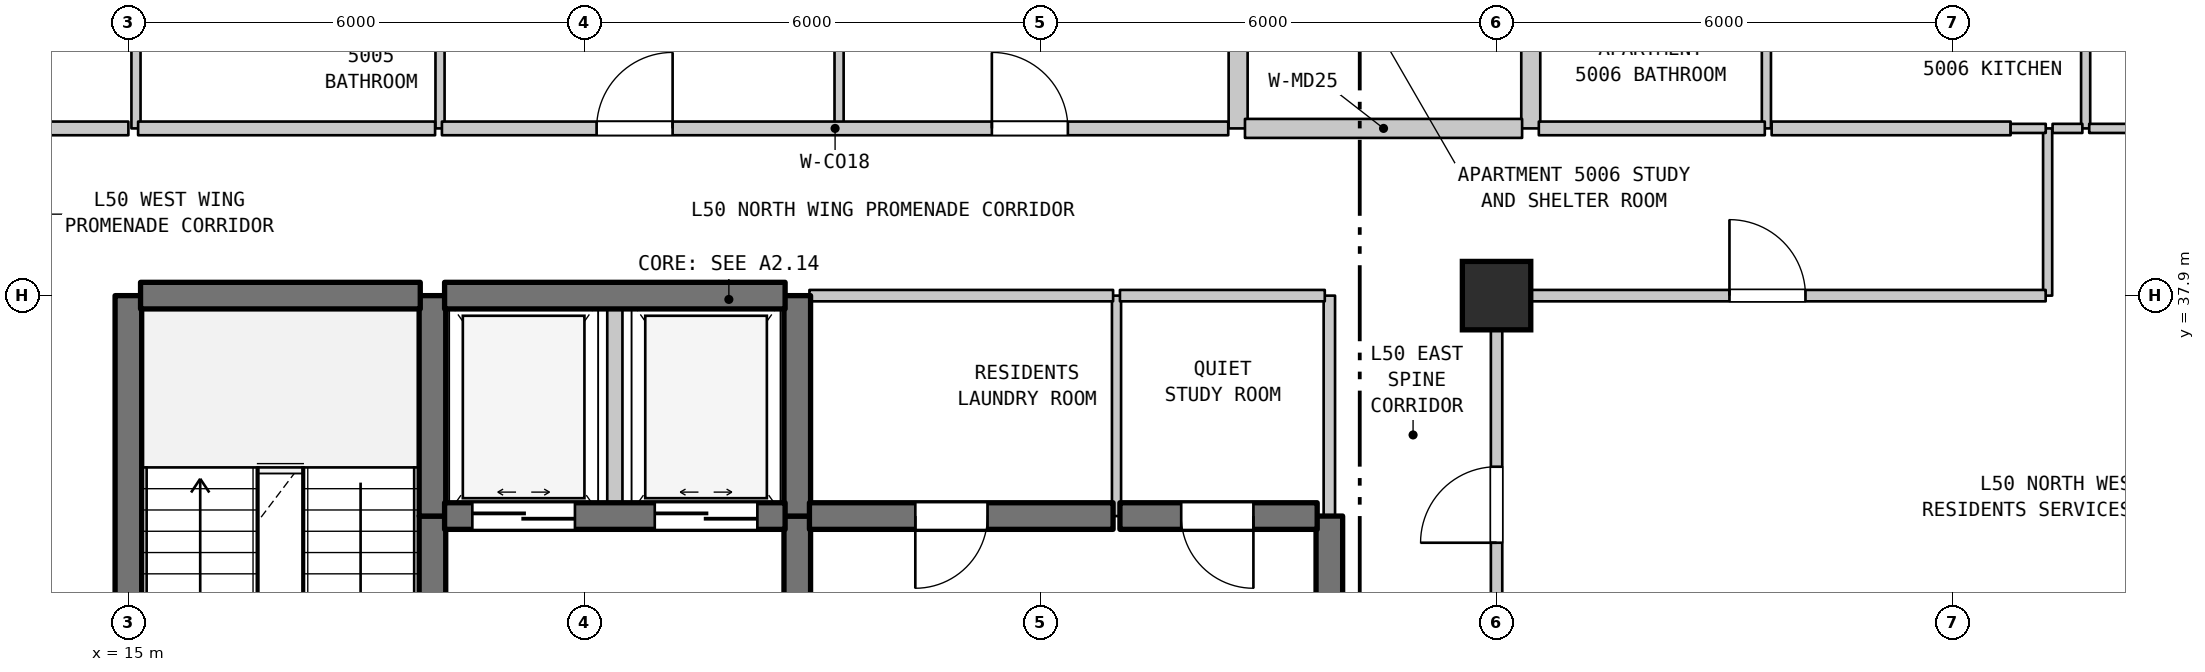
"""IFC4 building model, lengths in metres.
Left out: names, types, materials, properties, quantities, classifications, styles, units other than length and angle.
Written with IfcOpenShell. Run it as: python <this file> out.ifc"""

import sys

from ifc_helpers import new_model, si_unit, direction, frame, frame_2d, origin, origin_2d, place, context, subcontext, project, spatial, rectangle, extrude, element, fill, save


model = new_model("IFC4")
c1 = context("Model", 3, precision=1e-05, world=origin(), true_north=direction((0.0, 1.0)))
c2 = subcontext(c1, "Body", "Model", "MODEL_VIEW")
j1 = project(units=[si_unit("LENGTHUNIT", "METRE"), si_unit("PLANEANGLEUNIT", "RADIAN")], contexts=[c1])
p1 = place(None, origin())
s1 = spatial("IfcSite", under=j1, at=p1, CompositionType="ELEMENT")
p2 = place(p1, origin())
s2 = spatial("IfcBuilding", under=s1, at=p2, CompositionType="ELEMENT")
p3 = place(p2, frame((0.0, 0.0, 203.2)))
s3 = spatial("IfcBuildingStorey", under=s2, at=p3, CompositionType="ELEMENT", Elevation=203.2)
p4 = place(p3, frame((33.0, 37.9, 0.0), z_axis=(0.0, 0.0, 1.0), x_axis=(1.0, 0.0, 0.0)))
e1 = element("IfcColumn", 1, at=p4, inside=s3, PredefinedType="COLUMN", context=c2, shape_type="SweptSolid", body=[
    extrude(rectangle(XDim=0.9, YDim=0.9, at=origin_2d()), origin(), (0.0, 0.0, 1.0), 3.7),
])
p5 = place(p3, frame((15.0, 31.1, 0.0), z_axis=(0.0, 0.0, 1.0), x_axis=(0.0, 1.0, 0.0)))
e2 = element("IfcWall", 2, at=p5, inside=s3, PredefinedType="SHEAR", context=c2, shape_type="SweptSolid", body=[
    extrude(rectangle(XDim=6.8, YDim=0.35, at=frame_2d((3.4, 0.0))), origin(), (0.0, 0.0, 1.0), 3.39),
])
p6 = place(p3, frame((15.1, 40.1, 0.0), z_axis=(0.0, 0.0, 1.0), x_axis=(0.0, 1.0, 0.0)))
e3 = element("IfcWall", 3, at=p6, inside=s3, PredefinedType="PARTITIONING", context=c2, shape_type="SweptSolid", body=[
    extrude(rectangle(XDim=2.3, YDim=0.12, at=frame_2d((1.15, 0.0))), origin(), (0.0, 0.0, 1.0), 3.39),
])
p7 = place(p3, frame((19.0, 29.5, 0.0), z_axis=(0.0, 0.0, 1.0), x_axis=(0.0, 1.0, 0.0)))
e4 = element("IfcWall", 4, at=p7, inside=s3, PredefinedType="SHEAR", context=c2, shape_type="SweptSolid", body=[
    extrude(rectangle(XDim=5.5, YDim=0.35, at=frame_2d((2.75, 0.0))), origin(), (0.0, 0.0, 1.0), 3.39),
])
p8 = place(p7, frame((2.025, 0.0, 0.0)))
e5 = element("IfcOpeningElement", 5, at=p8, cuts=e4, PredefinedType="OPENING", context=c2, shape_type="SweptSolid", body=[
    extrude(rectangle(XDim=1.1, YDim=2.15, at=frame_2d((0.55, 1.075))), frame((0.0, 0.185, 0.0), z_axis=(0.0, -1.0, 0.0), x_axis=(1.0, 0.0, 0.0)), (0.0, 0.0, 1.0), 0.37),
])
p9 = place(p3, frame((19.0, 35.0, 0.0), z_axis=(0.0, 0.0, 1.0), x_axis=(0.0, 1.0, 0.0)))
e6 = element("IfcWall", 6, at=p9, inside=s3, PredefinedType="SHEAR", context=c2, shape_type="SweptSolid", body=[
    extrude(rectangle(XDim=2.9, YDim=0.35, at=frame_2d((1.45, 0.0))), origin(), (0.0, 0.0, 1.0), 3.39),
])
p10 = place(p3, frame((19.1, 40.1, 0.0), z_axis=(0.0, 0.0, 1.0), x_axis=(0.0, 1.0, 0.0)))
e7 = element("IfcWall", 7, at=p10, inside=s3, PredefinedType="PARTITIONING", context=c2, shape_type="SweptSolid", body=[
    extrude(rectangle(XDim=2.3, YDim=0.12, at=frame_2d((1.15, 0.0))), origin(), (0.0, 0.0, 1.0), 3.39),
])
p11 = place(p3, frame((21.4, 35.0, 0.0), z_axis=(0.0, 0.0, 1.0), x_axis=(0.0, 1.0, 0.0)))
e8 = element("IfcWall", 8, at=p11, inside=s3, PredefinedType="STANDARD", context=c2, shape_type="SweptSolid", body=[
    extrude(rectangle(XDim=2.9, YDim=0.2, at=frame_2d((1.45, 0.0))), origin(), (0.0, 0.0, 1.0), 3.39),
])
p12 = place(p3, frame((23.8, 31.5, 0.0), z_axis=(0.0, 0.0, 1.0), x_axis=(0.0, 1.0, 0.0)))
e9 = element("IfcWall", 9, at=p12, inside=s3, PredefinedType="SHEAR", context=c2, shape_type="SweptSolid", body=[
    extrude(rectangle(XDim=3.5, YDim=0.35, at=frame_2d((1.75, 0.0))), origin(), (0.0, 0.0, 1.0), 3.39),
])
p13 = place(p12, frame((1.127, 0.0, 0.0)))
e10 = element("IfcOpeningElement", 10, at=p13, cuts=e9, PredefinedType="OPENING", context=c2, shape_type="SweptSolid", body=[
    extrude(rectangle(XDim=1.1, YDim=2.15, at=frame_2d((0.55, 1.075))), frame((0.0, 0.185, 0.0), z_axis=(0.0, -1.0, 0.0), x_axis=(1.0, 0.0, 0.0)), (0.0, 0.0, 1.0), 0.37),
])
p14 = place(p3, frame((23.8, 35.0, 0.0), z_axis=(0.0, 0.0, 1.0), x_axis=(0.0, 1.0, 0.0)))
e11 = element("IfcWall", 11, at=p14, inside=s3, PredefinedType="SHEAR", context=c2, shape_type="SweptSolid", body=[
    extrude(rectangle(XDim=2.9, YDim=0.35, at=frame_2d((1.45, 0.0))), origin(), (0.0, 0.0, 1.0), 3.39),
])
p15 = place(p3, frame((24.35, 40.1, 0.0), z_axis=(0.0, 0.0, 1.0), x_axis=(0.0, 1.0, 0.0)))
e12 = element("IfcWall", 12, at=p15, inside=s3, PredefinedType="PARTITIONING", context=c2, shape_type="SweptSolid", body=[
    extrude(rectangle(XDim=2.05, YDim=0.12, at=frame_2d((1.025, 0.0))), origin(), (0.0, 0.0, 1.0), 3.39),
])
p16 = place(p3, frame((28.0, 35.0, 0.0), z_axis=(0.0, 0.0, 1.0), x_axis=(0.0, 1.0, 0.0)))
e13 = element("IfcWall", 13, at=p16, inside=s3, PredefinedType="PARTITIONING", context=c2, shape_type="SweptSolid", body=[
    extrude(rectangle(XDim=2.9, YDim=0.12, at=frame_2d((1.45, 0.0))), origin(), (0.0, 0.0, 1.0), 3.39),
])
p17 = place(p3, frame((29.6, 40.1, 0.0), z_axis=(0.0, 0.0, 1.0), x_axis=(0.0, 1.0, 0.0)))
e14 = element("IfcWall", 14, at=p17, inside=s3, PredefinedType="STANDARD", context=c2, shape_type="SweptSolid", body=[
    extrude(rectangle(XDim=2.3, YDim=0.25, at=frame_2d((1.15, 0.0))), origin(), (0.0, 0.0, 1.0), 3.39),
])
p18 = place(p3, frame((30.8, 31.5, 0.0), z_axis=(0.0, 0.0, 1.0), x_axis=(0.0, 1.0, 0.0)))
e15 = element("IfcWall", 15, at=p18, inside=s3, PredefinedType="SHEAR", context=c2, shape_type="SweptSolid", body=[
    extrude(rectangle(XDim=3.5, YDim=0.35, at=frame_2d((1.75, 0.0))), origin(), (0.0, 0.0, 1.0), 3.39),
])
p19 = place(p18, frame((1.15, 0.0, 0.0)))
e16 = element("IfcOpeningElement", 16, at=p19, cuts=e15, PredefinedType="OPENING", context=c2, shape_type="SweptSolid", body=[
    extrude(rectangle(XDim=1.2, YDim=2.2, at=frame_2d((0.6, 1.1))), frame((0.0, 0.185, 0.0), z_axis=(0.0, -1.0, 0.0), x_axis=(1.0, 0.0, 0.0)), (0.0, 0.0, 1.0), 0.37),
])
p20 = place(p3, frame((30.8, 35.0, 0.0), z_axis=(0.0, 0.0, 1.0), x_axis=(0.0, 1.0, 0.0)))
e17 = element("IfcWall", 17, at=p20, inside=s3, PredefinedType="STANDARD", context=c2, shape_type="SweptSolid", body=[
    extrude(rectangle(XDim=2.9, YDim=0.15, at=frame_2d((1.45, 0.0))), origin(), (0.0, 0.0, 1.0), 3.39),
])
p21 = place(p3, frame((33.0, 32.54, 0.0), z_axis=(0.0, 0.0, 1.0), x_axis=(0.0, 1.0, 0.0)))
e18 = element("IfcWall", 18, at=p21, inside=s3, PredefinedType="STANDARD", context=c2, shape_type="SweptSolid", body=[
    extrude(rectangle(XDim=5.36, YDim=0.15, at=frame_2d((2.68, 0.0))), origin(), (0.0, 0.0, 1.0), 2.89),
])
p22 = place(p21, frame((2.109, 0.0, 0.0)))
e19 = element("IfcOpeningElement", 19, at=p22, cuts=e18, PredefinedType="OPENING", context=c2, shape_type="SweptSolid", body=[
    extrude(rectangle(XDim=1.0, YDim=2.15, at=frame_2d((0.5, 1.075))), frame((0.0, 0.085, 0.0), z_axis=(0.0, -1.0, 0.0), x_axis=(1.0, 0.0, 0.0)), (0.0, 0.0, 1.0), 0.17),
])
p23 = place(p3, frame((33.45, 40.1, 0.0), z_axis=(0.0, 0.0, 1.0), x_axis=(0.0, 1.0, 0.0)))
e20 = element("IfcWall", 20, at=p23, inside=s3, PredefinedType="STANDARD", context=c2, shape_type="SweptSolid", body=[
    extrude(rectangle(XDim=2.3, YDim=0.25, at=frame_2d((1.15, 0.0))), origin(), (0.0, 0.0, 1.0), 3.39),
])
p24 = place(p3, frame((36.55, 40.1, 0.0), z_axis=(0.0, 0.0, 1.0), x_axis=(0.0, 1.0, 0.0)))
e21 = element("IfcWall", 21, at=p24, inside=s3, PredefinedType="PARTITIONING", context=c2, shape_type="SweptSolid", body=[
    extrude(rectangle(XDim=2.3, YDim=0.12, at=frame_2d((1.15, 0.0))), origin(), (0.0, 0.0, 1.0), 3.39),
])
p25 = place(p3, frame((40.25, 37.9, 0.0), z_axis=(0.0, 0.0, 1.0), x_axis=(0.0, 1.0, 0.0)))
e22 = element("IfcWall", 22, at=p25, inside=s3, PredefinedType="PARTITIONING", context=c2, shape_type="SweptSolid", body=[
    extrude(rectangle(XDim=2.2, YDim=0.12, at=frame_2d((1.1, 0.0))), origin(), (0.0, 0.0, 1.0), 3.39),
])
p26 = place(p3, frame((40.75, 40.1, 0.0), z_axis=(0.0, 0.0, 1.0), x_axis=(0.0, 1.0, 0.0)))
e23 = element("IfcWall", 23, at=p26, inside=s3, PredefinedType="PARTITIONING", context=c2, shape_type="SweptSolid", body=[
    extrude(rectangle(XDim=2.3, YDim=0.12, at=frame_2d((1.15, 0.0))), origin(), (0.0, 0.0, 1.0), 3.39),
])
p27 = place(p3, frame((19.16, 35.0, 0.0), z_axis=(0.0, 0.0, 1.0), x_axis=(1.0, 0.0, 0.0)))
e24 = element("IfcWall", 24, at=p27, inside=s3, PredefinedType="SHEAR", context=c2, shape_type="SweptSolid", body=[
    extrude(rectangle(XDim=4.48, YDim=0.35, at=frame_2d((2.24, 0.0))), origin(), (0.0, 0.0, 1.0), 3.39),
])
p28 = place(p27, frame((0.365, 0.0, 0.0)))
e25 = element("IfcOpeningElement", 25, at=p28, cuts=e24, PredefinedType="OPENING", context=c2, shape_type="SweptSolid", body=[
    extrude(rectangle(XDim=1.35, YDim=2.2, at=frame_2d((0.675, 1.1))), frame((0.0, 0.185, 0.0), z_axis=(0.0, -1.0, 0.0), x_axis=(1.0, 0.0, 0.0)), (0.0, 0.0, 1.0), 0.37),
])
p29 = place(p27, frame((2.765, 0.0, 0.0)))
e26 = element("IfcOpeningElement", 26, at=p29, cuts=e24, PredefinedType="OPENING", context=c2, shape_type="SweptSolid", body=[
    extrude(rectangle(XDim=1.35, YDim=2.2, at=frame_2d((0.675, 1.1))), frame((0.0, 0.185, 0.0), z_axis=(0.0, -1.0, 0.0), x_axis=(1.0, 0.0, 0.0)), (0.0, 0.0, 1.0), 0.37),
])
p30 = place(p3, frame((23.96, 35.0, 0.0), z_axis=(0.0, 0.0, 1.0), x_axis=(1.0, 0.0, 0.0)))
e27 = element("IfcWall", 27, at=p30, inside=s3, PredefinedType="SHEAR", context=c2, shape_type="SweptSolid", body=[
    extrude(rectangle(XDim=3.995, YDim=0.35, at=frame_2d((1.998, 0.0))), origin(), (0.0, 0.0, 1.0), 3.39),
])
p31 = place(p30, frame((1.393, 0.0, 0.0)))
e28 = element("IfcOpeningElement", 28, at=p31, cuts=e27, PredefinedType="OPENING", context=c2, shape_type="SweptSolid", body=[
    extrude(rectangle(XDim=0.95, YDim=2.15, at=frame_2d((0.475, 1.075))), frame((0.0, 0.185, 0.0), z_axis=(0.0, -1.0, 0.0), x_axis=(1.0, 0.0, 0.0)), (0.0, 0.0, 1.0), 0.37),
])
p32 = place(p3, frame((28.045, 35.0, 0.0), z_axis=(0.0, 0.0, 1.0), x_axis=(1.0, 0.0, 0.0)))
e29 = element("IfcWall", 29, at=p32, inside=s3, PredefinedType="SHEAR", context=c2, shape_type="SweptSolid", body=[
    extrude(rectangle(XDim=2.595, YDim=0.35, at=frame_2d((1.297, 0.0))), origin(), (0.0, 0.0, 1.0), 3.39),
])
p33 = place(p32, frame((0.806, 0.0, 0.0)))
e30 = element("IfcOpeningElement", 30, at=p33, cuts=e29, PredefinedType="OPENING", context=c2, shape_type="SweptSolid", body=[
    extrude(rectangle(XDim=0.95, YDim=2.15, at=frame_2d((0.475, 1.075))), frame((0.0, 0.185, 0.0), z_axis=(0.0, -1.0, 0.0), x_axis=(1.0, 0.0, 0.0)), (0.0, 0.0, 1.0), 0.37),
])
p34 = place(p3, frame((15.16, 37.9, 0.0), z_axis=(0.0, 0.0, 1.0), x_axis=(1.0, 0.0, 0.0)))
e31 = element("IfcWall", 31, at=p34, inside=s3, PredefinedType="SHEAR", context=c2, shape_type="SweptSolid", body=[
    extrude(rectangle(XDim=3.68, YDim=0.35, at=frame_2d((1.84, 0.0))), origin(), (0.0, 0.0, 1.0), 3.39),
])
p35 = place(p3, frame((19.16, 37.9, 0.0), z_axis=(0.0, 0.0, 1.0), x_axis=(1.0, 0.0, 0.0)))
e32 = element("IfcWall", 32, at=p35, inside=s3, PredefinedType="SHEAR", context=c2, shape_type="SweptSolid", body=[
    extrude(rectangle(XDim=4.48, YDim=0.35, at=frame_2d((2.24, 0.0))), origin(), (0.0, 0.0, 1.0), 3.39),
])
p36 = place(p3, frame((23.96, 37.9, 0.0), z_axis=(0.0, 0.0, 1.0), x_axis=(1.0, 0.0, 0.0)))
e33 = element("IfcWall", 33, at=p36, inside=s3, PredefinedType="STANDARD", context=c2, shape_type="SweptSolid", body=[
    extrude(rectangle(XDim=3.995, YDim=0.15, at=frame_2d((1.998, 0.0))), origin(), (0.0, 0.0, 1.0), 2.89),
])
p37 = place(p3, frame((28.045, 37.9, 0.0), z_axis=(0.0, 0.0, 1.0), x_axis=(1.0, 0.0, 0.0)))
e34 = element("IfcWall", 34, at=p37, inside=s3, PredefinedType="STANDARD", context=c2, shape_type="SweptSolid", body=[
    extrude(rectangle(XDim=2.695, YDim=0.15, at=frame_2d((1.348, 0.0))), origin(), (0.0, 0.0, 1.0), 2.89),
])
p38 = place(p3, frame((33.06, 37.9, 0.0), z_axis=(0.0, 0.0, 1.0), x_axis=(1.0, 0.0, 0.0)))
e35 = element("IfcWall", 35, at=p38, inside=s3, PredefinedType="STANDARD", context=c2, shape_type="SweptSolid", body=[
    extrude(rectangle(XDim=7.164, YDim=0.15, at=frame_2d((3.582, 0.0))), origin(), (0.0, 0.0, 1.0), 3.39),
])
p39 = place(p38, frame((3.004, 0.0, 0.0)))
e36 = element("IfcOpeningElement", 36, at=p39, cuts=e35, PredefinedType="OPENING", context=c2, shape_type="SweptSolid", body=[
    extrude(rectangle(XDim=1.0, YDim=2.15, at=frame_2d((0.5, 1.075))), frame((0.0, 0.085, 0.0), z_axis=(0.0, -1.0, 0.0), x_axis=(1.0, 0.0, 0.0)), (0.0, 0.0, 1.0), 0.17),
])
p40 = place(p3, frame((12.875, 40.1, 0.0), z_axis=(0.0, 0.0, 1.0), x_axis=(1.0, 0.0, 0.0)))
e37 = element("IfcWall", 37, at=p40, inside=s3, PredefinedType="STANDARD", context=c2, shape_type="SweptSolid", body=[
    extrude(rectangle(XDim=2.125, YDim=0.18, at=frame_2d((1.062, 0.0))), origin(), (0.0, 0.0, 1.0), 3.39),
])
p41 = place(p3, frame((15.128, 40.1, 0.0), z_axis=(0.0, 0.0, 1.0), x_axis=(1.0, 0.0, 0.0)))
e38 = element("IfcWall", 38, at=p41, inside=s3, PredefinedType="STANDARD", context=c2, shape_type="SweptSolid", body=[
    extrude(rectangle(XDim=3.907, YDim=0.18, at=frame_2d((1.954, 0.0))), origin(), (0.0, 0.0, 1.0), 3.39),
])
p42 = place(p3, frame((19.125, 40.1, 0.0), z_axis=(0.0, 0.0, 1.0), x_axis=(1.0, 0.0, 0.0)))
e39 = element("IfcWall", 39, at=p42, inside=s3, PredefinedType="STANDARD", context=c2, shape_type="SweptSolid", body=[
    extrude(rectangle(XDim=10.345, YDim=0.18, at=frame_2d((5.172, 0.0))), origin(), (0.0, 0.0, 1.0), 3.39),
])
p43 = place(p42, frame((2.035, 0.0, 0.0)))
e40 = element("IfcOpeningElement", 40, at=p43, cuts=e39, PredefinedType="OPENING", context=c2, shape_type="SweptSolid", body=[
    extrude(rectangle(XDim=1.0, YDim=2.15, at=frame_2d((0.5, 1.075))), frame((0.0, 0.1, 0.0), z_axis=(0.0, -1.0, 0.0), x_axis=(1.0, 0.0, 0.0)), (0.0, 0.0, 1.0), 0.2),
])
p44 = place(p42, frame((7.235, 0.0, 0.0)))
e41 = element("IfcOpeningElement", 41, at=p44, cuts=e39, PredefinedType="OPENING", context=c2, shape_type="SweptSolid", body=[
    extrude(rectangle(XDim=1.0, YDim=2.15, at=frame_2d((0.5, 1.075))), frame((0.0, 0.1, 0.0), z_axis=(0.0, -1.0, 0.0), x_axis=(1.0, 0.0, 0.0)), (0.0, 0.0, 1.0), 0.2),
])
p45 = place(p3, frame((29.69, 40.1, 0.0), z_axis=(0.0, 0.0, 1.0), x_axis=(1.0, 0.0, 0.0)))
e42 = element("IfcWall", 42, at=p45, inside=s3, PredefinedType="STANDARD", context=c2, shape_type="SweptSolid", body=[
    extrude(rectangle(XDim=3.646, YDim=0.25, at=frame_2d((1.823, 0.0))), origin(), (0.0, 0.0, 1.0), 3.39),
])
p46 = place(p3, frame((33.556, 40.1, 0.0), z_axis=(0.0, 0.0, 1.0), x_axis=(1.0, 0.0, 0.0)))
e43 = element("IfcWall", 43, at=p46, inside=s3, PredefinedType="STANDARD", context=c2, shape_type="SweptSolid", body=[
    extrude(rectangle(XDim=2.973, YDim=0.18, at=frame_2d((1.487, 0.0))), origin(), (0.0, 0.0, 1.0), 3.39),
])
p47 = place(p3, frame((36.619, 40.1, 0.0), z_axis=(0.0, 0.0, 1.0), x_axis=(1.0, 0.0, 0.0)))
e44 = element("IfcWall", 44, at=p47, inside=s3, PredefinedType="STANDARD", context=c2, shape_type="SweptSolid", body=[
    extrude(rectangle(XDim=3.144, YDim=0.18, at=frame_2d((1.572, 0.0))), origin(), (0.0, 0.0, 1.0), 3.39),
])
p48 = place(p3, frame((39.763, 40.1, 0.0), z_axis=(0.0, 0.0, 1.0), x_axis=(1.0, 0.0, 0.0)))
e45 = element("IfcWall", 45, at=p48, inside=s3, PredefinedType="PARTITIONING", context=c2, shape_type="SweptSolid", body=[
    extrude(rectangle(XDim=0.462, YDim=0.12, at=frame_2d((0.231, 0.0))), origin(), (0.0, 0.0, 1.0), 3.39),
])
p49 = place(p3, frame((40.315, 40.1, 0.0), z_axis=(0.0, 0.0, 1.0), x_axis=(1.0, 0.0, 0.0)))
e46 = element("IfcWall", 46, at=p49, inside=s3, PredefinedType="PARTITIONING", context=c2, shape_type="SweptSolid", body=[
    extrude(rectangle(XDim=0.392, YDim=0.12, at=frame_2d((0.196, 0.0))), origin(), (0.0, 0.0, 1.0), 3.39),
])
p50 = place(p3, frame((40.797, 40.1, 0.0), z_axis=(0.0, 0.0, 1.0), x_axis=(1.0, 0.0, 0.0)))
e47 = element("IfcWall", 47, at=p50, inside=s3, PredefinedType="PARTITIONING", context=c2, shape_type="SweptSolid", body=[
    extrude(rectangle(XDim=1.378, YDim=0.12, at=frame_2d((0.689, 0.0))), origin(), (0.0, 0.0, 1.0), 3.39),
])
p51 = place(p22, origin())
e48 = element("IfcDoor", 48, at=p51, inside=s3, OperationType="SINGLE_SWING_LEFT", PredefinedType="DOOR", context=c2, shape_type="SweptSolid", body=[
    extrude(rectangle(XDim=1.0, YDim=2.15, at=frame_2d((0.5, 1.075))), frame((0.0, 0.025, 0.0), z_axis=(0.0, -1.0, 0.0), x_axis=(1.0, 0.0, 0.0)), (0.0, 0.0, 1.0), 0.05),
])
fill(e19, e48)
p52 = place(p28, origin())
e49 = element("IfcDoor", 49, at=p52, inside=s3, OperationType="DOUBLE_DOOR_SLIDING", PredefinedType="DOOR", context=c2, shape_type="SweptSolid", body=[
    extrude(rectangle(XDim=1.35, YDim=2.2, at=frame_2d((0.675, 1.1))), frame((0.0, 0.025, 0.0), z_axis=(0.0, -1.0, 0.0), x_axis=(1.0, 0.0, 0.0)), (0.0, 0.0, 1.0), 0.05),
])
fill(e25, e49)
p53 = place(p29, origin())
e50 = element("IfcDoor", 50, at=p53, inside=s3, OperationType="DOUBLE_DOOR_SLIDING", PredefinedType="DOOR", context=c2, shape_type="SweptSolid", body=[
    extrude(rectangle(XDim=1.35, YDim=2.2, at=frame_2d((0.675, 1.1))), frame((0.0, 0.025, 0.0), z_axis=(0.0, -1.0, 0.0), x_axis=(1.0, 0.0, 0.0)), (0.0, 0.0, 1.0), 0.05),
])
fill(e26, e50)
p54 = place(p31, frame((0.95, 0.0, 0.0), z_axis=(0.0, 0.0, 1.0), x_axis=(-1.0, 0.0, 0.0)))
e51 = element("IfcDoor", 51, at=p54, inside=s3, OperationType="SINGLE_SWING_LEFT", PredefinedType="DOOR", context=c2, shape_type="SweptSolid", body=[
    extrude(rectangle(XDim=0.95, YDim=2.15, at=frame_2d((0.475, 1.075))), frame((0.0, 0.025, 0.0), z_axis=(0.0, -1.0, 0.0), x_axis=(1.0, 0.0, 0.0)), (0.0, 0.0, 1.0), 0.05),
])
fill(e28, e51)
p55 = place(p33, frame((0.95, 0.0, 0.0), z_axis=(0.0, 0.0, 1.0), x_axis=(-1.0, 0.0, 0.0)))
e52 = element("IfcDoor", 52, at=p55, inside=s3, OperationType="SINGLE_SWING_RIGHT", PredefinedType="DOOR", context=c2, shape_type="SweptSolid", body=[
    extrude(rectangle(XDim=0.95, YDim=2.15, at=frame_2d((0.475, 1.075))), frame((0.0, 0.025, 0.0), z_axis=(0.0, -1.0, 0.0), x_axis=(1.0, 0.0, 0.0)), (0.0, 0.0, 1.0), 0.05),
])
fill(e30, e52)
p56 = place(p39, origin())
e53 = element("IfcDoor", 53, at=p56, inside=s3, OperationType="SINGLE_SWING_LEFT", PredefinedType="DOOR", context=c2, shape_type="SweptSolid", body=[
    extrude(rectangle(XDim=1.0, YDim=2.15, at=frame_2d((0.5, 1.075))), frame((0.0, 0.025, 0.0), z_axis=(0.0, -1.0, 0.0), x_axis=(1.0, 0.0, 0.0)), (0.0, 0.0, 1.0), 0.05),
])
fill(e36, e53)
p57 = place(p43, origin())
e54 = element("IfcDoor", 54, at=p57, inside=s3, OperationType="SINGLE_SWING_RIGHT", PredefinedType="DOOR", context=c2, shape_type="SweptSolid", body=[
    extrude(rectangle(XDim=1.0, YDim=2.15, at=frame_2d((0.5, 1.075))), frame((0.0, 0.025, 0.0), z_axis=(0.0, -1.0, 0.0), x_axis=(1.0, 0.0, 0.0)), (0.0, 0.0, 1.0), 0.05),
])
fill(e40, e54)
p58 = place(p44, origin())
e55 = element("IfcDoor", 55, at=p58, inside=s3, OperationType="SINGLE_SWING_LEFT", PredefinedType="DOOR", context=c2, shape_type="SweptSolid", body=[
    extrude(rectangle(XDim=1.0, YDim=2.15, at=frame_2d((0.5, 1.075))), frame((0.0, 0.025, 0.0), z_axis=(0.0, -1.0, 0.0), x_axis=(1.0, 0.0, 0.0)), (0.0, 0.0, 1.0), 0.05),
])
fill(e41, e55)
save(model, sys.argv[1])
